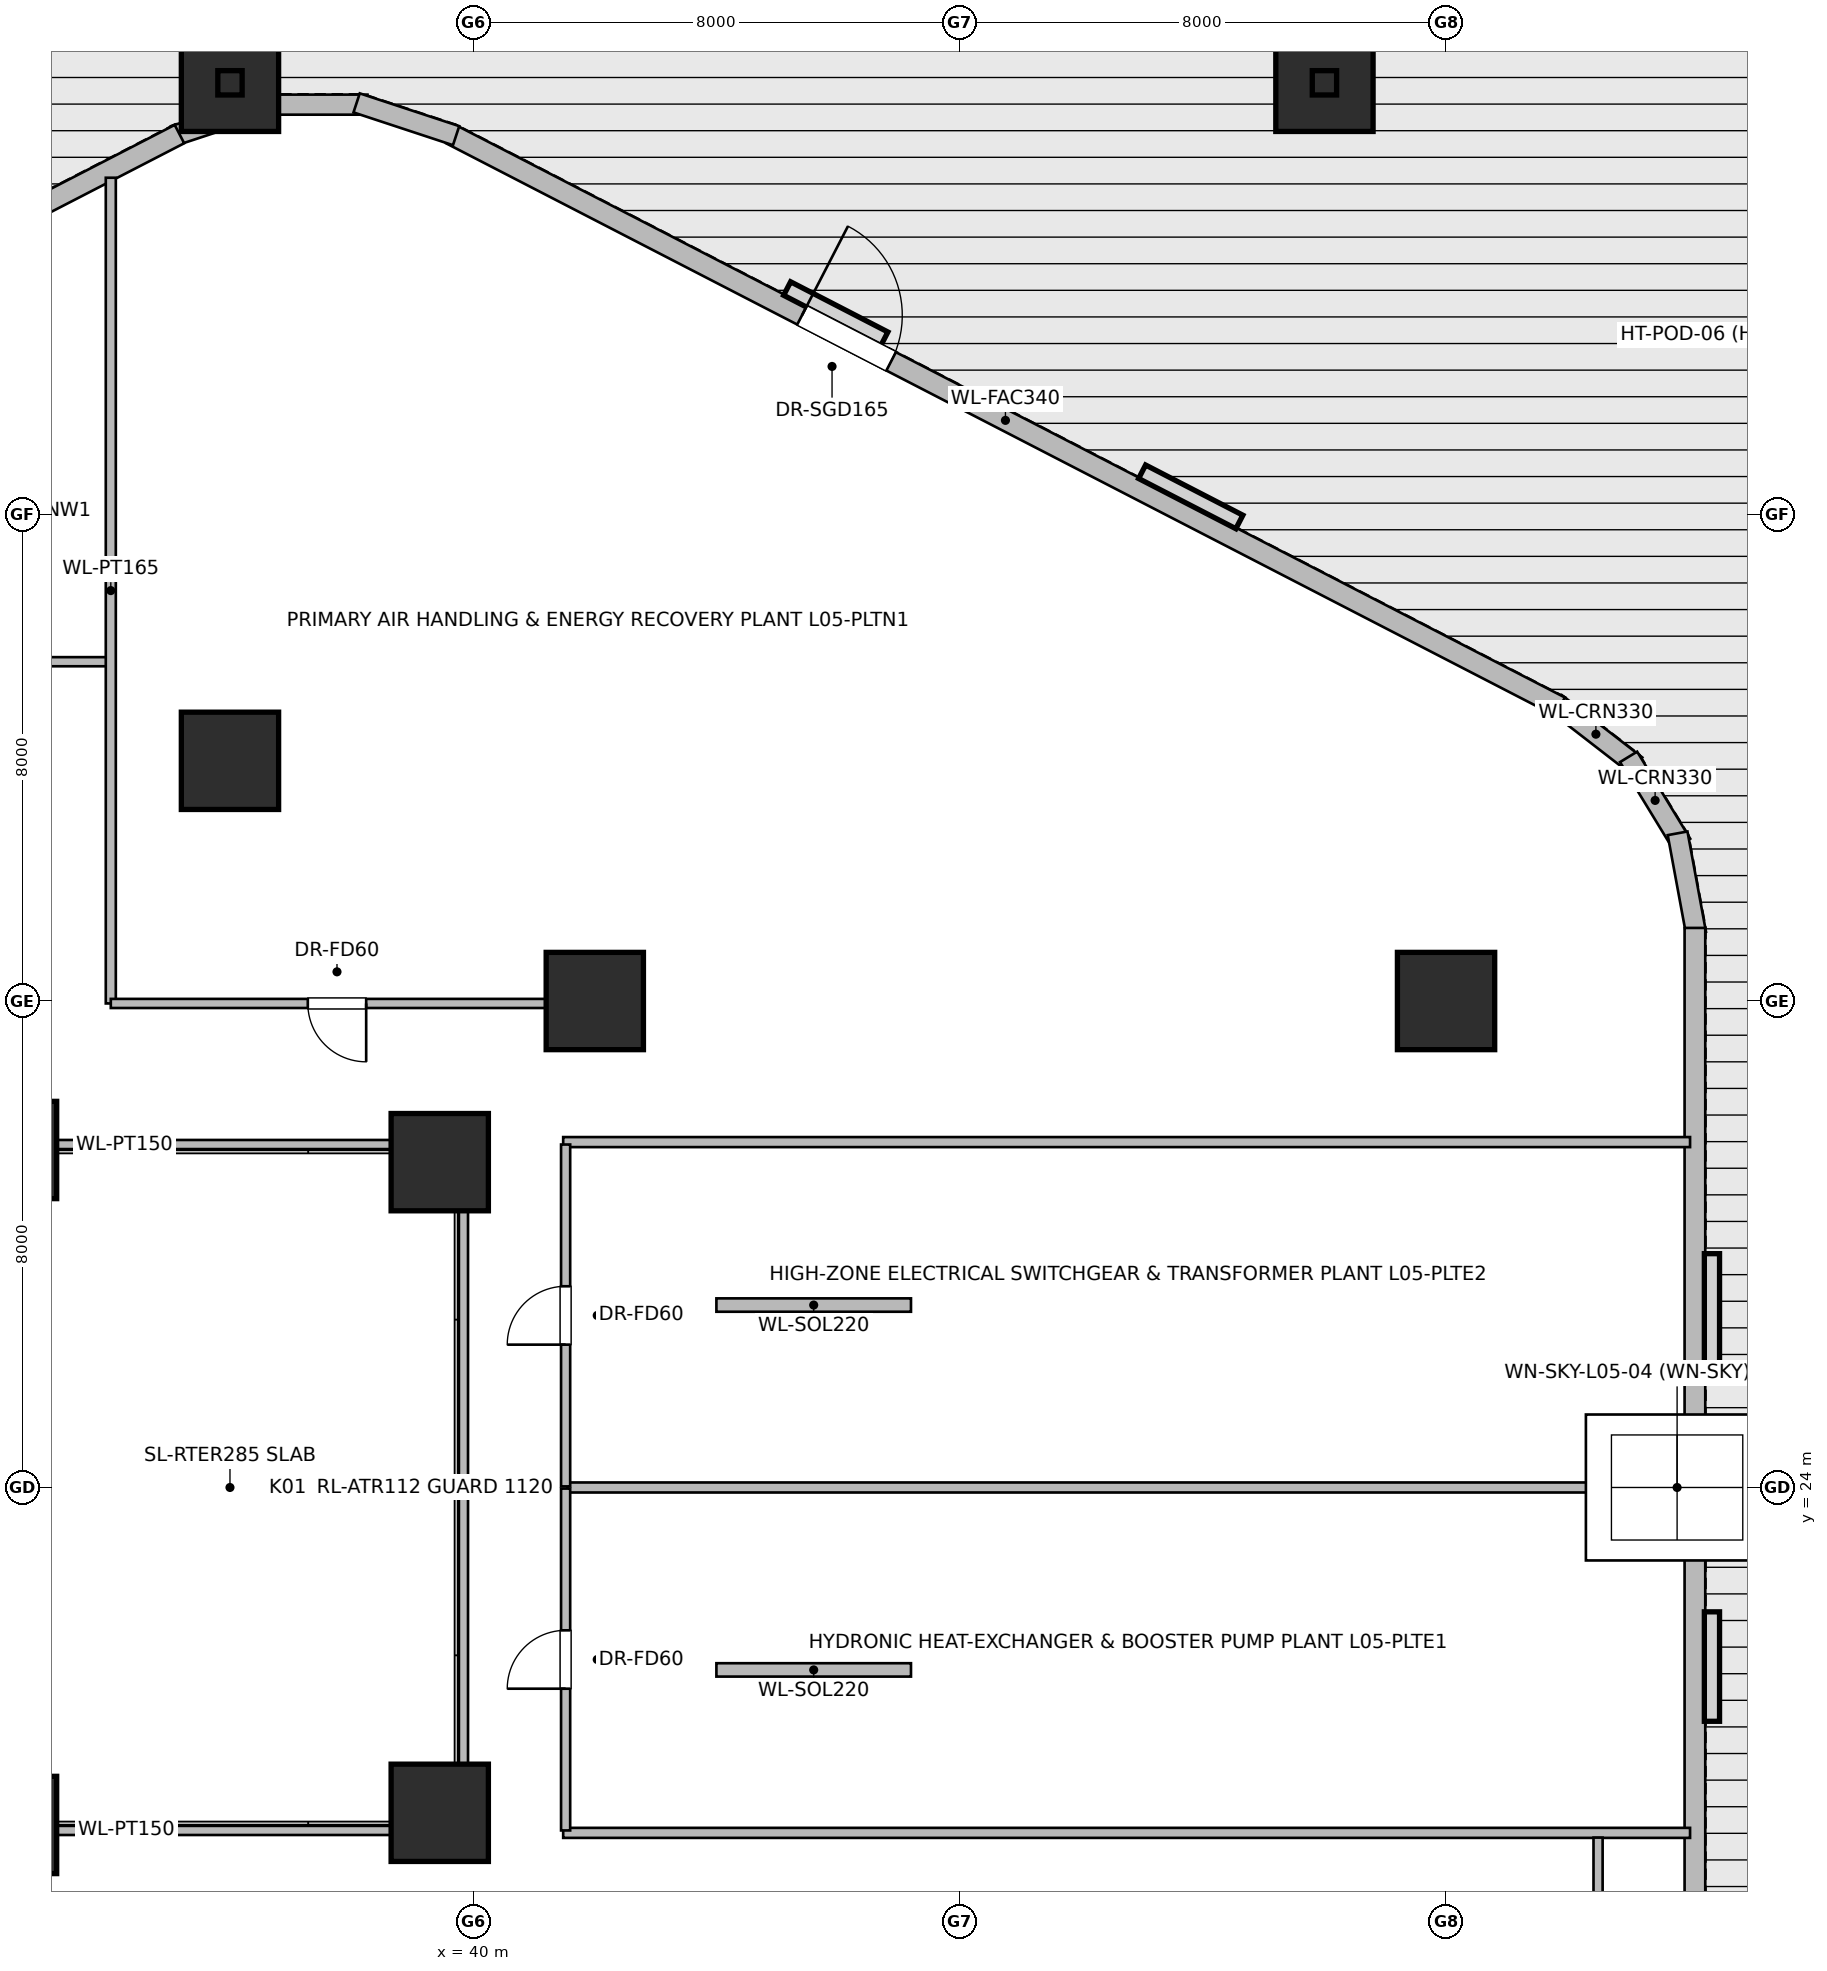
"""IFC4 building model, lengths in metres.
Left out: names, types, materials, properties, quantities, classifications, styles, units other than length and angle.
Written with IfcOpenShell. Run it as: python <this file> out.ifc"""

import sys

from ifc_helpers import new_model, si_unit, direction, frame, frame_2d, origin, origin_2d, place, context, subcontext, project, spatial, rectangle, hollow_rectangle, extrude, element, fill, save


model = new_model("IFC4")
c1 = context("Model", 3, precision=1e-05, world=origin(), true_north=direction((0.0, 1.0)))
c2 = subcontext(c1, "Body", "Model", "MODEL_VIEW")
j1 = project(units=[si_unit("LENGTHUNIT", "METRE"), si_unit("PLANEANGLEUNIT", "RADIAN")], contexts=[c1])
p1 = place(None, origin())
s1 = spatial("IfcSite", under=j1, at=p1, CompositionType="ELEMENT")
p2 = place(p1, origin())
s2 = spatial("IfcBuilding", under=s1, at=p2, CompositionType="ELEMENT")
p3 = place(p2, frame((0.0, 0.0, 21.0)))
s3 = spatial("IfcBuildingStorey", under=s2, at=p3, CompositionType="ELEMENT", Elevation=21.0)
for number, where, z_axis, x_axis in (
    (1, (32.35, 18.45, 0.0), (0.0, 0.0, 1.0), (1.0, 0.0, 0.0)),
    (2, (32.35, 29.55, 0.0), (0.0, 0.0, 1.0), (1.0, 0.0, 0.0)),
):
    element("IfcColumn", number, at=place(p3, frame(where, z_axis=z_axis, x_axis=x_axis)), inside=s3, PredefinedType="COLUMN", context=c2, shape_type="SweptSolid", body=[
        extrude(rectangle(XDim=1.6, YDim=1.6, at=origin_2d()), origin(), (0.0, 0.0, 1.0), 6.0),
    ])
for number, where, z_axis, x_axis in (
    (3, (36.0, 47.1, 0.0), (0.0, 0.0, 1.0), (1.0, 0.0, 0.0)),
    (4, (54.0, 47.1, 0.0), (0.0, 0.0, 1.0), (1.0, 0.0, 0.0)),
    (5, (42.0, 32.0, 0.0), (0.0, 0.0, 1.0), (1.0, 0.0, 0.0)),
    (6, (56.0, 32.0, 0.0), (0.0, 0.0, 1.0), (1.0, 0.0, 0.0)),
    (7, (36.0, 35.95, 0.0), (0.0, 0.0, 1.0), (1.0, 0.0, 0.0)),
):
    element("IfcColumn", number, at=place(p3, frame(where, z_axis=z_axis, x_axis=x_axis)), inside=s3, PredefinedType="COLUMN", context=c2, shape_type="SweptSolid", body=[
        extrude(rectangle(XDim=1.6, YDim=1.6, at=origin_2d()), origin(), (0.0, 0.0, 1.0), 5.5),
    ])
for number, where, z_axis, x_axis in (
    (8, (39.45, 18.65, 0.0), (0.0, 0.0, 1.0), (1.0, 0.0, 0.0)),
    (9, (39.45, 29.35, 0.0), (0.0, 0.0, 1.0), (1.0, 0.0, 0.0)),
):
    element("IfcColumn", number, at=place(p3, frame(where, z_axis=z_axis, x_axis=x_axis)), inside=s3, PredefinedType="COLUMN", context=c2, shape_type="SweptSolid", body=[
        extrude(rectangle(XDim=1.6, YDim=1.6, at=origin_2d()), origin(), (0.0, 0.0, 1.0), 6.0),
    ])
for number, where, z_axis, x_axis in (
    (10, (36.0, 47.1, 5.55), (0.0, 0.0, 1.0), (1.0, 0.0, 0.0)),
    (11, (54.0, 47.1, 5.55), (0.0, 0.0, 1.0), (1.0, 0.0, 0.0)),
):
    element("IfcColumn", number, at=place(p3, frame(where, z_axis=z_axis, x_axis=x_axis)), inside=s3, PredefinedType="USERDEFINED", context=c2, shape_type="SweptSolid", body=[
        extrude(hollow_rectangle(XDim=0.4, YDim=0.4, WallThickness=0.022, at=origin_2d()), origin(), (0.0, 0.0, 1.0), 3.25),
    ])
p4 = place(p3, frame((57.802, 36.901, 0.0), z_axis=(0.0, 0.0, 1.0), x_axis=(0.790691856293, -0.61221433207, 0.0)))
e12 = element("IfcWall", 12, at=p4, inside=s3, PredefinedType="STANDARD", context=c2, shape_type="SweptSolid", body=[
    extrude(rectangle(XDim=1.676, YDim=0.33, at=frame_2d((0.838, 0.0))), origin(), (0.0, 0.0, 1.0), 5.58),
])
p5 = place(p3, frame((59.002, 36.015, 0.0), z_axis=(0.0, 0.0, 1.0), x_axis=(0.520584129191, -0.853810379671, 0.0)))
e13 = element("IfcWall", 13, at=p5, inside=s3, PredefinedType="STANDARD", context=c2, shape_type="SweptSolid", body=[
    extrude(rectangle(XDim=1.677, YDim=0.33, at=frame_2d((0.838, 0.0))), origin(), (0.0, 0.0, 1.0), 5.58),
])
p6 = place(p3, frame((59.808, 34.758, 0.0), z_axis=(0.0, 0.0, 1.0), x_axis=(0.181714143354, -0.983351397063, 0.0)))
e14 = element("IfcWall", 14, at=p6, inside=s3, PredefinedType="STANDARD", context=c2, shape_type="SweptSolid", body=[
    extrude(rectangle(XDim=1.678, YDim=0.33, at=frame_2d((0.839, 0.0))), origin(), (0.0, 0.0, 1.0), 5.58),
])
p7 = place(p3, frame((39.631, 46.257, 0.0), z_axis=(0.0, 0.0, 1.0), x_axis=(0.888634413993, -0.458616264721, 0.0)))
e15 = element("IfcWall", 15, at=p7, inside=s3, PredefinedType="STANDARD", context=c2, shape_type="SweptSolid", body=[
    extrude(rectangle(XDim=20.531, YDim=0.34, at=frame_2d((10.266, 0.0))), origin(), (0.0, 0.0, 1.0), 3.6),
])
p8 = place(p7, frame((6.5, 0.0, 0.0)))
e16 = element("IfcOpeningElement", 16, at=p8, cuts=e15, PredefinedType="OPENING", context=c2, shape_type="SweptSolid", body=[
    extrude(rectangle(XDim=1.65, YDim=2.25, at=frame_2d((0.825, 1.125))), frame((0.0, 0.18, 0.0), z_axis=(0.0, -1.0, 0.0), x_axis=(1.0, 0.0, 0.0)), (0.0, 0.0, 1.0), 0.36),
])
p9 = place(p3, frame((35.081, 46.231, 0.0), z_axis=(0.0, 0.0, 1.0), x_axis=(0.94976901097, 0.312951794691, 0.0)))
e17 = element("IfcWall", 17, at=p9, inside=s3, PredefinedType="STANDARD", context=c2, shape_type="SweptSolid", body=[
    extrude(rectangle(XDim=1.722, YDim=0.33, at=frame_2d((0.861, 0.0))), origin(), (0.0, 0.0, 1.0), 3.6),
])
p10 = place(p3, frame((36.539, 46.741, 0.0), z_axis=(0.0, 0.0, 1.0), x_axis=(1.0, 0.0, 0.0)))
e18 = element("IfcWall", 18, at=p10, inside=s3, PredefinedType="STANDARD", context=c2, shape_type="SweptSolid", body=[
    extrude(rectangle(XDim=1.722, YDim=0.33, at=frame_2d((0.861, 0.0))), origin(), (0.0, 0.0, 1.0), 3.6),
])
p11 = place(p3, frame((38.083, 46.77, 0.0), z_axis=(0.0, 0.0, 1.0), x_axis=(0.94976901097, -0.312951794691, 0.0)))
e19 = element("IfcWall", 19, at=p11, inside=s3, PredefinedType="STANDARD", context=c2, shape_type="SweptSolid", body=[
    extrude(rectangle(XDim=1.722, YDim=0.33, at=frame_2d((0.861, 0.0))), origin(), (0.0, 0.0, 1.0), 3.6),
])
p12 = place(p3, frame((16.924, 36.841, 0.0), z_axis=(0.0, 0.0, 1.0), x_axis=(0.888634413993, 0.458616264721, 0.0)))
e20 = element("IfcWall", 20, at=p12, inside=s3, PredefinedType="STANDARD", context=c2, shape_type="SweptSolid", body=[
    extrude(rectangle(XDim=20.531, YDim=0.34, at=frame_2d((10.266, 0.0))), origin(), (0.0, 0.0, 1.0), 3.6),
])
p13 = place(p3, frame((60.093, 33.202, 0.0), z_axis=(0.0, 0.0, 1.0), x_axis=(0.0, -1.0, 0.0)))
e21 = element("IfcWall", 21, at=p13, inside=s3, PredefinedType="STANDARD", context=c2, shape_type="SweptSolid", body=[
    extrude(rectangle(XDim=18.404, YDim=0.34, at=frame_2d((9.202, 0.0))), origin(), (0.0, 0.0, 1.0), 3.6),
])
for number, where, z_axis, x_axis in (
    (22, (44.0, 21.0, 0.0), (0.0, 0.0, 1.0), (1.0, 0.0, 0.0)),
    (23, (44.0, 27.0, 0.0), (0.0, 0.0, 1.0), (1.0, 0.0, 0.0)),
):
    element("IfcWall", number, at=place(p3, frame(where, z_axis=z_axis, x_axis=x_axis)), inside=s3, PredefinedType="SOLIDWALL", context=c2, shape_type="SweptSolid", body=[
        extrude(rectangle(XDim=3.2, YDim=0.22, at=frame_2d((1.6, 0.0))), origin(), (0.0, 0.0, 1.0), 2.8),
    ])
p14 = place(p3, frame((27.7, 18.36, 0.0), z_axis=(0.0, 0.0, 1.0), x_axis=(1.0, 0.0, 0.0)))
e24 = element("IfcWall", 24, at=p14, inside=s3, PredefinedType="PARTITIONING", context=c2, shape_type="SweptSolid", body=[
    extrude(rectangle(XDim=12.14, YDim=0.15, at=frame_2d((6.07, 0.0))), origin(), (0.0, 0.0, 1.0), 3.6),
])
p15 = place(p3, frame((39.84, 29.64, 0.0), z_axis=(0.0, 0.0, 1.0), x_axis=(-1.0, 0.0, 0.0)))
e25 = element("IfcWall", 25, at=p15, inside=s3, PredefinedType="PARTITIONING", context=c2, shape_type="SweptSolid", body=[
    extrude(rectangle(XDim=12.2, YDim=0.15, at=frame_2d((6.1, 0.0))), origin(), (0.0, 0.0, 1.0), 3.6),
])
p16 = place(p3, frame((39.84, 18.36, 0.0), z_axis=(0.0, 0.0, 1.0), x_axis=(0.0, 1.0, 0.0)))
e26 = element("IfcWall", 26, at=p16, inside=s3, PredefinedType="PARTITIONING", context=c2, shape_type="SweptSolid", body=[
    extrude(rectangle(XDim=11.28, YDim=0.15, at=frame_2d((5.64, 0.0))), origin(), (0.0, 0.0, 1.0), 5.58),
])
p17 = place(p3, frame((34.0, 37.58, 0.0), z_axis=(0.0, 0.0, 1.0), x_axis=(-1.0, 0.0, 0.0)))
e27 = element("IfcWall", 27, at=p17, inside=s3, PredefinedType="PARTITIONING", context=c2, shape_type="SweptSolid", body=[
    extrude(rectangle(XDim=15.6, YDim=0.15, at=frame_2d((7.8, 0.0))), origin(), (0.0, 0.0, 1.0), 5.58),
])
p18 = place(p17, frame((4.07, 0.0, 0.0)))
e28 = element("IfcOpeningElement", 28, at=p18, cuts=e27, PredefinedType="OPENING", context=c2, shape_type="SweptSolid", body=[
    extrude(rectangle(XDim=0.96, YDim=2.0, at=frame_2d((0.48, 1.0))), frame((0.0, 0.085, 0.0), z_axis=(0.0, -1.0, 0.0), x_axis=(1.0, 0.0, 0.0)), (0.0, 0.0, 1.0), 0.17),
])
p19 = place(p3, frame((34.04, 31.96, 0.0), z_axis=(0.0, 0.0, 1.0), x_axis=(0.0, 1.0, 0.0)))
e29 = element("IfcWall", 29, at=p19, inside=s3, PredefinedType="PARTITIONING", context=c2, shape_type="SweptSolid", body=[
    extrude(rectangle(XDim=13.579, YDim=0.165, at=frame_2d((6.79, 0.0))), origin(), (0.0, 0.0, 1.0), 5.58),
])
p20 = place(p3, frame((41.48, 31.96, 0.0), z_axis=(0.0, 0.0, 1.0), x_axis=(-1.0, 0.0, 0.0)))
e30 = element("IfcWall", 30, at=p20, inside=s3, PredefinedType="PARTITIONING", context=c2, shape_type="SweptSolid", body=[
    extrude(rectangle(XDim=7.44, YDim=0.15, at=frame_2d((3.72, 0.0))), origin(), (0.0, 0.0, 1.0), 3.6),
])
p21 = place(p20, frame((3.24, 0.0, 0.0)))
e31 = element("IfcOpeningElement", 31, at=p21, cuts=e30, PredefinedType="OPENING", context=c2, shape_type="SweptSolid", body=[
    extrude(rectangle(XDim=0.96, YDim=2.0, at=frame_2d((0.48, 1.0))), frame((0.0, 0.085, 0.0), z_axis=(0.0, -1.0, 0.0), x_axis=(1.0, 0.0, 0.0)), (0.0, 0.0, 1.0), 0.17),
])
for number, where, z_axis, x_axis in (
    (32, (41.48, 18.32, 0.0), (0.0, 0.0, 1.0), (1.0, 0.0, 0.0)),
    (33, (41.48, 29.68, 0.0), (0.0, 0.0, 1.0), (1.0, 0.0, 0.0)),
):
    element("IfcWall", number, at=place(p3, frame(where, z_axis=z_axis, x_axis=x_axis)), inside=s3, PredefinedType="PARTITIONING", context=c2, shape_type="SweptSolid", body=[
        extrude(rectangle(XDim=18.533, YDim=0.165, at=frame_2d((9.267, 0.0))), origin(), (0.0, 0.0, 1.0), 5.58),
    ])
p22 = place(p3, frame((41.55, 24.0, 0.0), z_axis=(0.0, 0.0, 1.0), x_axis=(1.0, 0.0, 0.0)))
e34 = element("IfcWall", 34, at=p22, inside=s3, PredefinedType="PARTITIONING", context=c2, shape_type="SweptSolid", body=[
    extrude(rectangle(XDim=18.423, YDim=0.165, at=frame_2d((9.211, 0.0))), origin(), (0.0, 0.0, 1.0), 5.58),
])
p23 = place(p3, frame((41.52, 18.36, 0.0), z_axis=(0.0, 0.0, 1.0), x_axis=(0.0, 1.0, 0.0)))
e35 = element("IfcWall", 35, at=p23, inside=s3, PredefinedType="PARTITIONING", context=c2, shape_type="SweptSolid", body=[
    extrude(rectangle(XDim=5.622, YDim=0.15, at=frame_2d((2.811, 0.0))), origin(), (0.0, 0.0, 1.0), 3.6),
])
p24 = place(p23, frame((2.331, 0.0, 0.0)))
e36 = element("IfcOpeningElement", 36, at=p24, cuts=e35, PredefinedType="OPENING", context=c2, shape_type="SweptSolid", body=[
    extrude(rectangle(XDim=0.96, YDim=2.0, at=frame_2d((0.48, 1.0))), frame((0.0, 0.085, 0.0), z_axis=(0.0, -1.0, 0.0), x_axis=(1.0, 0.0, 0.0)), (0.0, 0.0, 1.0), 0.17),
])
p25 = place(p3, frame((41.52, 24.018, 0.0), z_axis=(0.0, 0.0, 1.0), x_axis=(0.0, 1.0, 0.0)))
e37 = element("IfcWall", 37, at=p25, inside=s3, PredefinedType="PARTITIONING", context=c2, shape_type="SweptSolid", body=[
    extrude(rectangle(XDim=5.622, YDim=0.15, at=frame_2d((2.811, 0.0))), origin(), (0.0, 0.0, 1.0), 3.6),
])
p26 = place(p25, frame((2.331, 0.0, 0.0)))
e38 = element("IfcOpeningElement", 38, at=p26, cuts=e37, PredefinedType="OPENING", context=c2, shape_type="SweptSolid", body=[
    extrude(rectangle(XDim=0.96, YDim=2.0, at=frame_2d((0.48, 1.0))), frame((0.0, 0.085, 0.0), z_axis=(0.0, -1.0, 0.0), x_axis=(1.0, 0.0, 0.0)), (0.0, 0.0, 1.0), 0.17),
])
p27 = place(p3, frame((58.5, 18.242, 0.0), z_axis=(0.0, 0.0, 1.0), x_axis=(0.0, -1.0, 0.0)))
e39 = element("IfcWall", 39, at=p27, inside=s3, PredefinedType="PARTITIONING", context=c2, shape_type="SweptSolid", body=[
    extrude(rectangle(XDim=2.212, YDim=0.15, at=frame_2d((1.106, 0.0))), origin(), (0.0, 0.0, 1.0), 5.58),
])
p28 = place(p8, origin())
e40 = element("IfcDoor", 40, at=p28, inside=s3, OperationType="SINGLE_SWING_LEFT", PredefinedType="DOOR", context=c2, shape_type="SweptSolid", body=[
    extrude(rectangle(XDim=1.65, YDim=2.25, at=frame_2d((0.825, 1.125))), frame((0.0, 0.025, 0.0), z_axis=(0.0, -1.0, 0.0), x_axis=(1.0, 0.0, 0.0)), (0.0, 0.0, 1.0), 0.05),
])
fill(e16, e40)
p29 = place(p3, frame((0.0, 0.0, -0.285)))
p30 = place(p29, frame((59.8, 24.0, 0.0)))
p31 = place(p30, frame((0.0, 0.0, 0.235)))
e41 = element("IfcWindow", 41, at=p31, inside=s3, PartitioningType="SINGLE_PANEL", PredefinedType="SKYLIGHT", context=c2, shape_type="SweptSolid", body=[
    extrude(rectangle(XDim=3.0, YDim=2.4, at=origin_2d()), origin(), (0.0, 0.0, 1.0), 0.05),
])
p32 = place(p21, origin())
e42 = element("IfcDoor", 42, at=p32, inside=s3, OperationType="SINGLE_SWING_LEFT", PredefinedType="DOOR", context=c2, shape_type="SweptSolid", body=[
    extrude(rectangle(XDim=0.96, YDim=2.0, at=frame_2d((0.48, 1.0))), frame((0.0, 0.025, 0.0), z_axis=(0.0, -1.0, 0.0), x_axis=(1.0, 0.0, 0.0)), (0.0, 0.0, 1.0), 0.05),
])
fill(e31, e42)
p33 = place(p24, origin())
e43 = element("IfcDoor", 43, at=p33, inside=s3, OperationType="SINGLE_SWING_LEFT", PredefinedType="DOOR", context=c2, shape_type="SweptSolid", body=[
    extrude(rectangle(XDim=0.96, YDim=2.0, at=frame_2d((0.48, 1.0))), frame((0.0, 0.025, 0.0), z_axis=(0.0, -1.0, 0.0), x_axis=(1.0, 0.0, 0.0)), (0.0, 0.0, 1.0), 0.05),
])
fill(e36, e43)
p34 = place(p26, origin())
e44 = element("IfcDoor", 44, at=p34, inside=s3, OperationType="SINGLE_SWING_LEFT", PredefinedType="DOOR", context=c2, shape_type="SweptSolid", body=[
    extrude(rectangle(XDim=0.96, YDim=2.0, at=frame_2d((0.48, 1.0))), frame((0.0, 0.025, 0.0), z_axis=(0.0, -1.0, 0.0), x_axis=(1.0, 0.0, 0.0)), (0.0, 0.0, 1.0), 0.05),
])
fill(e38, e44)
save(model, sys.argv[1])
